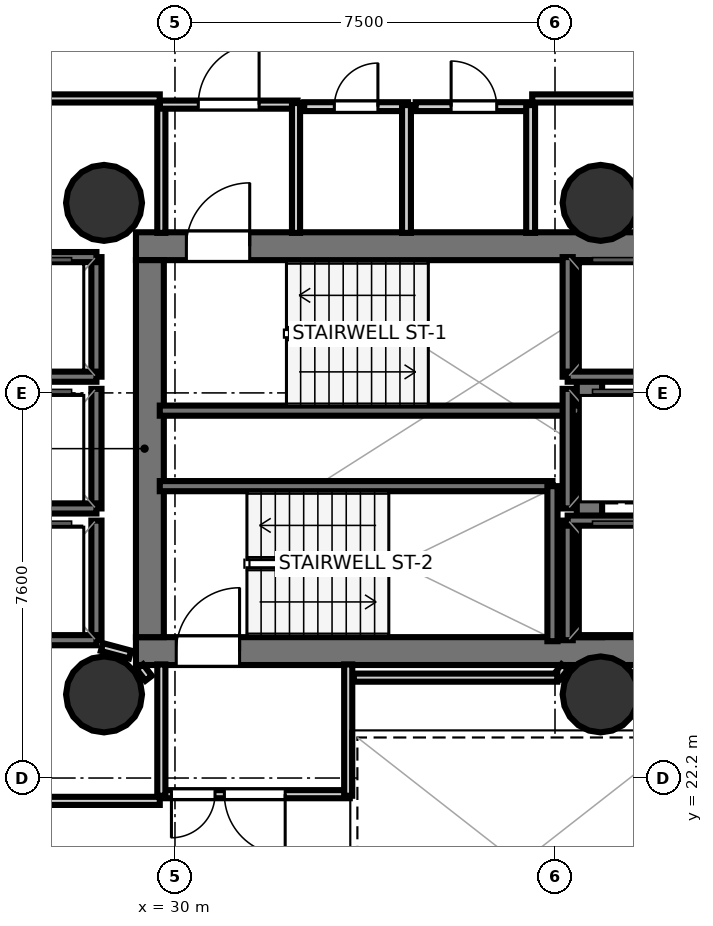
"""IFC4 building model, lengths in metres.
Left out: names, types, materials, properties, quantities, classifications, styles, units other than length and angle.
Written with IfcOpenShell. Run it as: python <this file> out.ifc"""

import sys

from ifc_helpers import new_model, si_unit, direction, frame, frame_2d, origin, origin_2d, place, context, subcontext, project, spatial, rectangle, hollow_circle, extrude, element, fill, save


model = new_model("IFC4")
c1 = context("Model", 3, precision=1e-05, world=origin(), true_north=direction((0.0, 1.0)))
c2 = subcontext(c1, "Body", "Model", "MODEL_VIEW")
j1 = project(units=[si_unit("LENGTHUNIT", "METRE"), si_unit("PLANEANGLEUNIT", "RADIAN")], contexts=[c1])
p1 = place(None, origin())
s1 = spatial("IfcSite", under=j1, at=p1, CompositionType="ELEMENT")
p2 = place(p1, origin())
s2 = spatial("IfcBuilding", under=s1, at=p2, CompositionType="ELEMENT")
p3 = place(p2, frame((0.0, 0.0, 112.6)))
s3 = spatial("IfcBuildingStorey", under=s2, at=p3, CompositionType="ELEMENT", Elevation=112.6)
p4 = place(p3, frame((29.23, 32.695, 0.0), z_axis=(0.0, 0.0, 1.0), x_axis=(1.0, 0.0, 0.0)))
e1 = element("IfcWall", 1, at=p4, inside=s3, PredefinedType="SHEAR", context=c2, shape_type="SweptSolid", body=[
    extrude(rectangle(XDim=10.62, YDim=0.55, at=frame_2d((5.31, 0.0))), origin(), (0.0, 0.0, 1.0), 3.52),
])
p5 = place(p4, frame((0.995, 0.0, 0.0)))
e2 = element("IfcOpeningElement", 2, at=p5, cuts=e1, PredefinedType="OPENING", context=c2, shape_type="SweptSolid", body=[
    extrude(rectangle(XDim=1.25, YDim=2.15, at=frame_2d((0.625, 1.075))), frame((0.0, 0.285, 0.0), z_axis=(0.0, -1.0, 0.0), x_axis=(1.0, 0.0, 0.0)), (0.0, 0.0, 1.0), 0.57),
])
p6 = place(p3, frame((29.23, 24.705, 0.0), z_axis=(0.0, 0.0, 1.0), x_axis=(1.0, 0.0, 0.0)))
e3 = element("IfcWall", 3, at=p6, inside=s3, PredefinedType="SHEAR", context=c2, shape_type="SweptSolid", body=[
    extrude(rectangle(XDim=10.62, YDim=0.55, at=frame_2d((5.31, 0.0))), origin(), (0.0, 0.0, 1.0), 3.52),
])
p7 = place(p6, frame((0.795, 0.0, 0.0)))
e4 = element("IfcOpeningElement", 4, at=p7, cuts=e3, PredefinedType="OPENING", context=c2, shape_type="SweptSolid", body=[
    extrude(rectangle(XDim=1.25, YDim=2.15, at=frame_2d((0.625, 1.075))), frame((0.0, 0.285, 0.0), z_axis=(0.0, -1.0, 0.0), x_axis=(1.0, 0.0, 0.0)), (0.0, 0.0, 1.0), 0.57),
])
p8 = place(p3, frame((29.505, 24.98, 0.0), z_axis=(0.0, 0.0, 1.0), x_axis=(0.0, 1.0, 0.0)))
e5 = element("IfcWall", 5, at=p8, inside=s3, PredefinedType="SHEAR", context=c2, shape_type="SweptSolid", body=[
    extrude(rectangle(XDim=7.44, YDim=0.55, at=frame_2d((3.72, 0.0))), origin(), (0.0, 0.0, 1.0), 3.52),
])
p9 = place(p3, frame((38.18, 24.98, 0.0), z_axis=(0.0, 0.0, 1.0), x_axis=(0.0, 1.0, 0.0)))
e6 = element("IfcWall", 6, at=p9, inside=s3, PredefinedType="SHEAR", context=c2, shape_type="SweptSolid", body=[
    extrude(rectangle(XDim=7.44, YDim=0.5, at=frame_2d((3.72, 0.0))), origin(), (0.0, 0.0, 1.0), 3.52),
])
for number, where, z_axis, x_axis in (
    (7, (28.6, 33.55, 0.0), (0.0, 0.0, 1.0), (1.0, 0.0, 0.0)),
    (8, (28.6, 23.85, 0.0), (0.0, 0.0, 1.0), (1.0, 0.0, 0.0)),
    (9, (38.4, 33.55, 0.0), (0.0, 0.0, 1.0), (1.0, 0.0, 0.0)),
    (10, (38.4, 23.85, 0.0), (0.0, 0.0, 1.0), (1.0, 0.0, 0.0)),
):
    element("IfcColumn", number, at=place(p3, frame(where, z_axis=z_axis, x_axis=x_axis)), inside=s3, PredefinedType="COLUMN", context=c2, shape_type="SweptSolid", body=[
        extrude(hollow_circle(Radius=0.75, WallThickness=0.036, at=origin_2d()), origin(), (0.0, 0.0, 1.0), 3.7),
    ])
p10 = place(p3, frame((29.7, 29.45, 0.0), z_axis=(0.0, 0.0, 1.0), x_axis=(1.0, 0.0, 0.0)))
e11 = element("IfcWall", 11, at=p10, inside=s3, PredefinedType="SOLIDWALL", context=c2, shape_type="SweptSolid", body=[
    extrude(rectangle(XDim=8.3, YDim=0.2, at=frame_2d((4.15, 0.0))), origin(), (0.0, 0.0, 1.0), 3.52),
])
p11 = place(p3, frame((29.7, 27.96, 0.0), z_axis=(0.0, 0.0, 1.0), x_axis=(1.0, 0.0, 0.0)))
e12 = element("IfcWall", 12, at=p11, inside=s3, PredefinedType="SOLIDWALL", context=c2, shape_type="SweptSolid", body=[
    extrude(rectangle(XDim=7.75, YDim=0.2, at=frame_2d((3.875, 0.0))), origin(), (0.0, 0.0, 1.0), 3.52),
])
p12 = place(p3, frame((37.45, 24.9, 0.0), z_axis=(0.0, 0.0, 1.0), x_axis=(0.0, 1.0, 0.0)))
e13 = element("IfcWall", 13, at=p12, inside=s3, PredefinedType="SOLIDWALL", context=c2, shape_type="SweptSolid", body=[
    extrude(rectangle(XDim=3.06, YDim=0.2, at=frame_2d((1.53, 0.0))), origin(), (0.0, 0.0, 1.0), 3.52),
])
p13 = place(p3, frame((37.75, 30.12, 0.0), z_axis=(0.0, 0.0, 1.0), x_axis=(0.0, 1.0, 0.0)))
e14 = element("IfcWall", 14, at=p13, inside=s3, PredefinedType="SOLIDWALL", context=c2, shape_type="SweptSolid", body=[
    extrude(rectangle(XDim=2.36, YDim=0.2, at=frame_2d((1.18, 0.0))), origin(), (0.0, 0.0, 1.0), 3.52),
])
p14 = place(p3, frame((37.75, 30.12, 0.0), z_axis=(0.0, 0.0, 1.0), x_axis=(1.0, 0.0, 0.0)))
e15 = element("IfcWall", 15, at=p14, inside=s3, PredefinedType="SOLIDWALL", context=c2, shape_type="SweptSolid", body=[
    extrude(rectangle(XDim=2.1, YDim=0.2, at=frame_2d((1.05, 0.0))), origin(), (0.0, 0.0, 1.0), 3.52),
])
p15 = place(p3, frame((37.75, 24.92, 0.0), z_axis=(0.0, 0.0, 1.0), x_axis=(0.0, 1.0, 0.0)))
e16 = element("IfcWall", 16, at=p15, inside=s3, PredefinedType="SOLIDWALL", context=c2, shape_type="SweptSolid", body=[
    extrude(rectangle(XDim=2.36, YDim=0.2, at=frame_2d((1.18, 0.0))), origin(), (0.0, 0.0, 1.0), 3.52),
])
p16 = place(p3, frame((37.75, 27.28, 0.0), z_axis=(0.0, 0.0, 1.0), x_axis=(1.0, 0.0, 0.0)))
e17 = element("IfcWall", 17, at=p16, inside=s3, PredefinedType="SOLIDWALL", context=c2, shape_type="SweptSolid", body=[
    extrude(rectangle(XDim=2.1, YDim=0.2, at=frame_2d((1.05, 0.0))), origin(), (0.0, 0.0, 1.0), 3.52),
])
p17 = place(p3, frame((28.45, 30.12, 0.0), z_axis=(0.0, 0.0, 1.0), x_axis=(0.0, 1.0, 0.0)))
e18 = element("IfcWall", 18, at=p17, inside=s3, PredefinedType="SOLIDWALL", context=c2, shape_type="SweptSolid", body=[
    extrude(rectangle(XDim=2.36, YDim=0.2, at=frame_2d((1.18, 0.0))), origin(), (0.0, 0.0, 1.0), 3.52),
])
for number, where, z_axis, x_axis in (
    (19, (26.35, 32.48, 0.0), (0.0, 0.0, 1.0), (1.0, 0.0, 0.0)),
    (20, (26.35, 30.12, 0.0), (0.0, 0.0, 1.0), (1.0, 0.0, 0.0)),
):
    element("IfcWall", number, at=place(p3, frame(where, z_axis=z_axis, x_axis=x_axis)), inside=s3, PredefinedType="SOLIDWALL", context=c2, shape_type="SweptSolid", body=[
        extrude(rectangle(XDim=2.1, YDim=0.2, at=frame_2d((1.05, 0.0))), origin(), (0.0, 0.0, 1.0), 3.52),
    ])
p18 = place(p3, frame((28.45, 27.52, 0.0), z_axis=(0.0, 0.0, 1.0), x_axis=(0.0, 1.0, 0.0)))
e21 = element("IfcWall", 21, at=p18, inside=s3, PredefinedType="SOLIDWALL", context=c2, shape_type="SweptSolid", body=[
    extrude(rectangle(XDim=2.36, YDim=0.2, at=frame_2d((1.18, 0.0))), origin(), (0.0, 0.0, 1.0), 3.52),
])
p19 = place(p3, frame((26.35, 27.52, 0.0), z_axis=(0.0, 0.0, 1.0), x_axis=(1.0, 0.0, 0.0)))
e22 = element("IfcWall", 22, at=p19, inside=s3, PredefinedType="SOLIDWALL", context=c2, shape_type="SweptSolid", body=[
    extrude(rectangle(XDim=2.1, YDim=0.2, at=frame_2d((1.05, 0.0))), origin(), (0.0, 0.0, 1.0), 3.52),
])
p20 = place(p3, frame((28.45, 24.92, 0.0), z_axis=(0.0, 0.0, 1.0), x_axis=(0.0, 1.0, 0.0)))
e23 = element("IfcWall", 23, at=p20, inside=s3, PredefinedType="SOLIDWALL", context=c2, shape_type="SweptSolid", body=[
    extrude(rectangle(XDim=2.36, YDim=0.2, at=frame_2d((1.18, 0.0))), origin(), (0.0, 0.0, 1.0), 3.52),
])
p21 = place(p3, frame((26.35, 24.92, 0.0), z_axis=(0.0, 0.0, 1.0), x_axis=(1.0, 0.0, 0.0)))
e24 = element("IfcWall", 24, at=p21, inside=s3, PredefinedType="SOLIDWALL", context=c2, shape_type="SweptSolid", body=[
    extrude(rectangle(XDim=2.1, YDim=0.2, at=frame_2d((1.05, 0.0))), origin(), (0.0, 0.0, 1.0), 3.52),
])
p22 = place(p3, frame((37.75, 27.52, 0.0), z_axis=(0.0, 0.0, 1.0), x_axis=(0.0, 1.0, 0.0)))
e25 = element("IfcWall", 25, at=p22, inside=s3, PredefinedType="SOLIDWALL", context=c2, shape_type="SweptSolid", body=[
    extrude(rectangle(XDim=2.36, YDim=0.2, at=frame_2d((1.18, 0.0))), origin(), (0.0, 0.0, 1.0), 3.52),
])
p23 = place(p3, frame((29.731, 32.958, 0.0), z_axis=(0.0, 0.0, 1.0), x_axis=(0.0, 1.0, 0.0)))
e26 = element("IfcWall", 26, at=p23, inside=s3, PredefinedType="PARTITIONING", context=c2, shape_type="SweptSolid", body=[
    extrude(rectangle(XDim=2.562, YDim=0.16, at=frame_2d((1.281, 0.0))), origin(), (0.0, 0.0, 1.0), 2.84),
])
p24 = place(p3, frame((29.7, 35.489, 0.0), z_axis=(0.0, 0.0, 1.0), x_axis=(1.0, 0.0, 0.0)))
e27 = element("IfcWall", 27, at=p24, inside=s3, PredefinedType="PARTITIONING", context=c2, shape_type="SweptSolid", body=[
    extrude(rectangle(XDim=2.72, YDim=0.16, at=frame_2d((1.36, 0.0))), origin(), (0.0, 0.0, 1.0), 2.84),
])
p25 = place(p24, frame((0.76, 0.0, 0.0)))
e28 = element("IfcOpeningElement", 28, at=p25, cuts=e27, PredefinedType="OPENING", context=c2, shape_type="SweptSolid", body=[
    extrude(rectangle(XDim=1.2, YDim=2.15, at=frame_2d((0.6, 1.075))), frame((0.0, 0.09, 0.0), z_axis=(0.0, -1.0, 0.0), x_axis=(1.0, 0.0, 0.0)), (0.0, 0.0, 1.0), 0.18),
])
p26 = place(p3, frame((32.389, 35.52, 0.0), z_axis=(0.0, 0.0, 1.0), x_axis=(0.0, -1.0, 0.0)))
e29 = element("IfcWall", 29, at=p26, inside=s3, PredefinedType="PARTITIONING", context=c2, shape_type="SweptSolid", body=[
    extrude(rectangle(XDim=2.562, YDim=0.16, at=frame_2d((1.281, 0.0))), origin(), (0.0, 0.0, 1.0), 2.84),
])
p27 = place(p3, frame((33.45, 21.881, 0.0), z_axis=(0.0, 0.0, 1.0), x_axis=(-1.0, 0.0, 0.0)))
e30 = element("IfcWall", 30, at=p27, inside=s3, PredefinedType="PARTITIONING", context=c2, shape_type="SweptSolid", body=[
    extrude(rectangle(XDim=3.75, YDim=0.16, at=frame_2d((1.875, 0.0))), origin(), (0.0, 0.0, 1.0), 2.84),
])
p28 = place(p27, frame((1.275, 0.0, 0.0)))
e31 = element("IfcOpeningElement", 31, at=p28, cuts=e30, PredefinedType="OPENING", context=c2, shape_type="SweptSolid", body=[
    extrude(rectangle(XDim=1.2, YDim=2.15, at=frame_2d((0.6, 1.075))), frame((0.0, 0.09, 0.0), z_axis=(0.0, -1.0, 0.0), x_axis=(1.0, 0.0, 0.0)), (0.0, 0.0, 1.0), 0.18),
])
p29 = place(p27, frame((2.66, 0.0, 0.0)))
e32 = element("IfcOpeningElement", 32, at=p29, cuts=e30, PredefinedType="OPENING", context=c2, shape_type="SweptSolid", body=[
    extrude(rectangle(XDim=0.86, YDim=2.05, at=frame_2d((0.43, 1.025))), frame((0.0, 0.09, 0.0), z_axis=(0.0, -1.0, 0.0), x_axis=(1.0, 0.0, 0.0)), (0.0, 0.0, 1.0), 0.18),
])
for number, where, z_axis, x_axis in (
    (33, (29.731, 21.85, 0.0), (0.0, 0.0, 1.0), (0.0, 1.0, 0.0)),
    (34, (33.419, 24.442, 0.0), (0.0, 0.0, 1.0), (0.0, -1.0, 0.0)),
):
    element("IfcWall", number, at=place(p3, frame(where, z_axis=z_axis, x_axis=x_axis)), inside=s3, PredefinedType="PARTITIONING", context=c2, shape_type="SweptSolid", body=[
        extrude(rectangle(XDim=2.592, YDim=0.16, at=frame_2d((1.296, 0.0))), origin(), (0.0, 0.0, 1.0), 2.84),
    ])
p30 = place(p3, frame((32.55, 35.449, 0.0), z_axis=(0.0, 0.0, 1.0), x_axis=(1.0, 0.0, 0.0)))
e35 = element("IfcWall", 35, at=p30, inside=s3, PredefinedType="PLUMBINGWALL", context=c2, shape_type="SweptSolid", body=[
    extrude(rectangle(XDim=2.05, YDim=0.175, at=frame_2d((1.025, 0.0))), origin(), (0.0, 0.0, 1.0), 2.84),
])
p31 = place(p30, frame((0.595, 0.0, 0.0)))
e36 = element("IfcOpeningElement", 36, at=p31, cuts=e35, PredefinedType="OPENING", context=c2, shape_type="SweptSolid", body=[
    extrude(rectangle(XDim=0.86, YDim=2.05, at=frame_2d((0.43, 1.025))), frame((0.0, 0.097, 0.0), z_axis=(0.0, -1.0, 0.0), x_axis=(1.0, 0.0, 0.0)), (0.0, 0.0, 1.0), 0.195),
])
p32 = place(p3, frame((34.569, 35.48, 0.0), z_axis=(0.0, 0.0, 1.0), x_axis=(0.0, -1.0, 0.0)))
e37 = element("IfcWall", 37, at=p32, inside=s3, PredefinedType="PLUMBINGWALL", context=c2, shape_type="SweptSolid", body=[
    extrude(rectangle(XDim=2.522, YDim=0.175, at=frame_2d((1.261, 0.0))), origin(), (0.0, 0.0, 1.0), 2.84),
])
p33 = place(p3, frame((34.75, 35.449, 0.0), z_axis=(0.0, 0.0, 1.0), x_axis=(1.0, 0.0, 0.0)))
e38 = element("IfcWall", 38, at=p33, inside=s3, PredefinedType="PLUMBINGWALL", context=c2, shape_type="SweptSolid", body=[
    extrude(rectangle(XDim=2.3, YDim=0.175, at=frame_2d((1.15, 0.0))), origin(), (0.0, 0.0, 1.0), 2.84),
])
p34 = place(p33, frame((0.7, 0.0, 0.0)))
e39 = element("IfcOpeningElement", 39, at=p34, cuts=e38, PredefinedType="OPENING", context=c2, shape_type="SweptSolid", body=[
    extrude(rectangle(XDim=0.9, YDim=2.1, at=frame_2d((0.45, 1.05))), frame((0.0, 0.097, 0.0), z_axis=(0.0, -1.0, 0.0), x_axis=(1.0, 0.0, 0.0)), (0.0, 0.0, 1.0), 0.195),
])
p35 = place(p3, frame((37.019, 35.48, 0.0), z_axis=(0.0, 0.0, 1.0), x_axis=(0.0, -1.0, 0.0)))
e40 = element("IfcWall", 40, at=p35, inside=s3, PredefinedType="PLUMBINGWALL", context=c2, shape_type="SweptSolid", body=[
    extrude(rectangle(XDim=2.522, YDim=0.175, at=frame_2d((1.261, 0.0))), origin(), (0.0, 0.0, 1.0), 2.84),
])
p36 = place(p3, frame((29.48, 24.169, 0.0), z_axis=(0.0, 0.0, 1.0), x_axis=(-0.607608252226, 0.794236873878, 0.0)))
e41 = element("IfcWall", 41, at=p36, inside=s3, PredefinedType="PARTITIONING", context=c2, shape_type="SweptSolid", body=[
    extrude(rectangle(XDim=0.286, YDim=0.16, at=frame_2d((0.143, 0.0))), origin(), (0.0, 0.0, 1.0), 2.84),
])
p37 = place(p3, frame((29.114, 24.637, 0.0), z_axis=(0.0, 0.0, 1.0), x_axis=(-0.966199685486, 0.257794817183, 0.0)))
e42 = element("IfcWall", 42, at=p37, inside=s3, PredefinedType="PARTITIONING", context=c2, shape_type="SweptSolid", body=[
    extrude(rectangle(XDim=0.575, YDim=0.16, at=frame_2d((0.288, 0.0))), origin(), (0.0, 0.0, 1.0), 2.84),
])
p38 = place(p3, frame((37.694, 24.396, 0.0), z_axis=(0.0, 0.0, 1.0), x_axis=(-0.607118658061, -0.794611184815, 0.0)))
e43 = element("IfcWall", 43, at=p38, inside=s3, PredefinedType="PARTITIONING", context=c2, shape_type="SweptSolid", body=[
    extrude(rectangle(XDim=0.246, YDim=0.16, at=frame_2d((0.123, 0.0))), origin(), (0.0, 0.0, 1.0), 2.84),
])
p39 = place(p3, frame((37.545, 24.181, 0.0), z_axis=(0.0, 0.0, 1.0), x_axis=(-1.0, 0.0, 0.0)))
e44 = element("IfcWall", 44, at=p39, inside=s3, PredefinedType="PARTITIONING", context=c2, shape_type="SweptSolid", body=[
    extrude(rectangle(XDim=4.015, YDim=0.16, at=frame_2d((2.007, 0.0))), origin(), (0.0, 0.0, 1.0), 2.84),
])
p40 = place(p3, frame((39.818, 35.611, 0.0), z_axis=(0.0, 0.0, 1.0), x_axis=(-1.0, 0.0, 0.0)))
e45 = element("IfcWall", 45, at=p40, inside=s3, PredefinedType="PARTITIONING", context=c2, shape_type="SweptSolid", body=[
    extrude(rectangle(XDim=2.768, YDim=0.16, at=frame_2d((1.384, 0.0))), origin(), (0.0, 0.0, 1.0), 2.84),
])
for number, where, z_axis, x_axis in (
    (46, (29.7, 35.611, 0.0), (0.0, 0.0, 1.0), (-1.0, 0.0, 0.0)),
    (47, (26.42, 21.749, 0.0), (0.0, 0.0, 1.0), (1.0, 0.0, 0.0)),
):
    element("IfcWall", number, at=place(p3, frame(where, z_axis=z_axis, x_axis=x_axis)), inside=s3, PredefinedType="PARTITIONING", context=c2, shape_type="SweptSolid", body=[
        extrude(rectangle(XDim=3.28, YDim=0.16, at=frame_2d((1.64, 0.0))), origin(), (0.0, 0.0, 1.0), 2.84),
    ])
p41 = place(p5, origin())
e48 = element("IfcDoor", 48, at=p41, inside=s3, OperationType="SINGLE_SWING_RIGHT", PredefinedType="DOOR", context=c2, shape_type="SweptSolid", body=[
    extrude(rectangle(XDim=1.25, YDim=2.15, at=frame_2d((0.625, 1.075))), frame((0.0, 0.025, 0.0), z_axis=(0.0, -1.0, 0.0), x_axis=(1.0, 0.0, 0.0)), (0.0, 0.0, 1.0), 0.05),
])
fill(e2, e48)
p42 = place(p7, origin())
e49 = element("IfcDoor", 49, at=p42, inside=s3, OperationType="SINGLE_SWING_RIGHT", PredefinedType="DOOR", context=c2, shape_type="SweptSolid", body=[
    extrude(rectangle(XDim=1.25, YDim=2.15, at=frame_2d((0.625, 1.075))), frame((0.0, 0.025, 0.0), z_axis=(0.0, -1.0, 0.0), x_axis=(1.0, 0.0, 0.0)), (0.0, 0.0, 1.0), 0.05),
])
fill(e4, e49)
p43 = place(p25, origin())
e50 = element("IfcDoor", 50, at=p43, inside=s3, OperationType="SINGLE_SWING_RIGHT", PredefinedType="DOOR", context=c2, shape_type="SweptSolid", body=[
    extrude(rectangle(XDim=1.2, YDim=2.15, at=frame_2d((0.6, 1.075))), frame((0.0, 0.025, 0.0), z_axis=(0.0, -1.0, 0.0), x_axis=(1.0, 0.0, 0.0)), (0.0, 0.0, 1.0), 0.05),
])
fill(e28, e50)
p44 = place(p28, origin())
e51 = element("IfcDoor", 51, at=p44, inside=s3, OperationType="SINGLE_SWING_LEFT", PredefinedType="DOOR", context=c2, shape_type="SweptSolid", body=[
    extrude(rectangle(XDim=1.2, YDim=2.15, at=frame_2d((0.6, 1.075))), frame((0.0, 0.025, 0.0), z_axis=(0.0, -1.0, 0.0), x_axis=(1.0, 0.0, 0.0)), (0.0, 0.0, 1.0), 0.05),
])
fill(e31, e51)
p45 = place(p31, origin())
e52 = element("IfcDoor", 52, at=p45, inside=s3, OperationType="SINGLE_SWING_RIGHT", PredefinedType="DOOR", context=c2, shape_type="SweptSolid", body=[
    extrude(rectangle(XDim=0.86, YDim=2.05, at=frame_2d((0.43, 1.025))), frame((0.0, 0.025, 0.0), z_axis=(0.0, -1.0, 0.0), x_axis=(1.0, 0.0, 0.0)), (0.0, 0.0, 1.0), 0.05),
])
fill(e36, e52)
p46 = place(p34, origin())
e53 = element("IfcDoor", 53, at=p46, inside=s3, OperationType="SINGLE_SWING_LEFT", PredefinedType="DOOR", context=c2, shape_type="SweptSolid", body=[
    extrude(rectangle(XDim=0.9, YDim=2.1, at=frame_2d((0.45, 1.05))), frame((0.0, 0.025, 0.0), z_axis=(0.0, -1.0, 0.0), x_axis=(1.0, 0.0, 0.0)), (0.0, 0.0, 1.0), 0.05),
])
fill(e39, e53)
p47 = place(p29, origin())
e54 = element("IfcDoor", 54, at=p47, inside=s3, OperationType="SINGLE_SWING_RIGHT", PredefinedType="DOOR", context=c2, shape_type="SweptSolid", body=[
    extrude(rectangle(XDim=0.86, YDim=2.05, at=frame_2d((0.43, 1.025))), frame((0.0, 0.025, 0.0), z_axis=(0.0, -1.0, 0.0), x_axis=(1.0, 0.0, 0.0)), (0.0, 0.0, 1.0), 0.05),
])
fill(e32, e54)
save(model, sys.argv[1])
